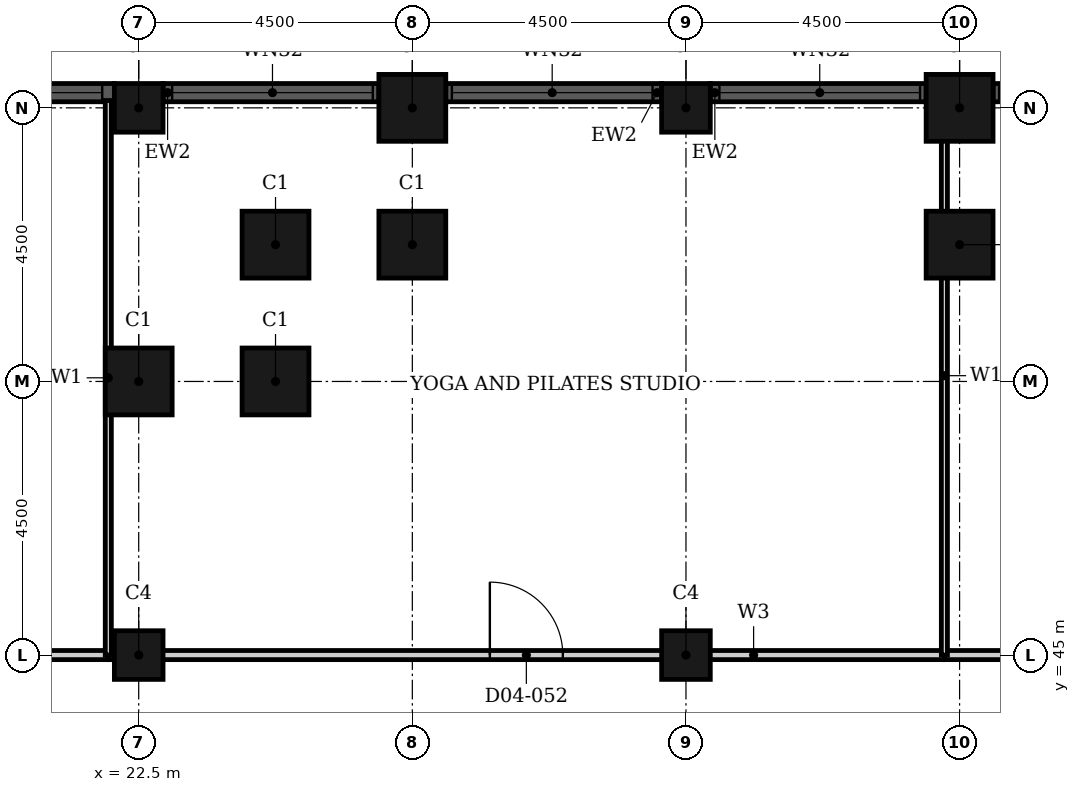
"""IFC4 building model, lengths in metres.
Left out: names, types, materials, properties, quantities, classifications, styles, units other than length and angle.
Written with IfcOpenShell. Run it as: python <this file> out.ifc"""

import sys

from ifc_helpers import new_model, si_unit, direction, frame, frame_2d, origin, origin_2d, place, context, subcontext, project, spatial, rectangle, hollow_rectangle, extrude, element, fill, save


model = new_model("IFC4")
c1 = context("Model", 3, precision=1e-05, world=origin(), true_north=direction((0.0, 1.0)))
c2 = subcontext(c1, "Body", "Model", "MODEL_VIEW")
j1 = project(units=[si_unit("LENGTHUNIT", "METRE"), si_unit("PLANEANGLEUNIT", "RADIAN")], contexts=[c1])
p1 = place(None, origin())
s1 = spatial("IfcSite", under=j1, at=p1, CompositionType="ELEMENT")
p2 = place(p1, origin())
s2 = spatial("IfcBuilding", under=s1, at=p2, CompositionType="ELEMENT")
p3 = place(p2, frame((0.0, 0.0, 24.0)))
s3 = spatial("IfcBuildingStorey", under=s2, at=p3, CompositionType="ELEMENT", Elevation=24.0)
for number, where, z_axis, x_axis in (
    (1, (36.0, 51.75, 0.0), (0.0, 0.0, 1.0), (1.0, 0.0, 0.0)),
    (2, (36.0, 54.0, 0.0), (0.0, 0.0, 1.0), (1.0, 0.0, 0.0)),
    (3, (27.0, 54.0, 0.0), (0.0, 0.0, 1.0), (1.0, 0.0, 0.0)),
    (4, (27.0, 51.75, 0.0), (0.0, 0.0, 1.0), (1.0, 0.0, 0.0)),
    (5, (24.75, 51.75, 0.0), (0.0, 0.0, 1.0), (1.0, 0.0, 0.0)),
    (6, (24.75, 49.5, 0.0), (0.0, 0.0, 1.0), (1.0, 0.0, 0.0)),
    (7, (22.5, 49.5, 0.0), (0.0, 0.0, 1.0), (1.0, 0.0, 0.0)),
):
    element("IfcColumn", number, at=place(p3, frame(where, z_axis=z_axis, x_axis=x_axis)), inside=s3, PredefinedType="COLUMN", context=c2, shape_type="SweptSolid", body=[
        extrude(hollow_rectangle(XDim=1.1, YDim=1.1, WallThickness=0.036, at=origin_2d()), origin(), (0.0, 0.0, 1.0), 4.8),
    ])
for number, where, z_axis, x_axis in (
    (8, (22.5, 54.0, 0.0), (0.0, 0.0, 1.0), (1.0, 0.0, 0.0)),
    (9, (31.5, 54.0, 0.0), (0.0, 0.0, 1.0), (1.0, 0.0, 0.0)),
    (10, (22.5, 45.0, 0.0), (0.0, 0.0, 1.0), (1.0, 0.0, 0.0)),
    (11, (31.5, 45.0, 0.0), (0.0, 0.0, 1.0), (1.0, 0.0, 0.0)),
):
    element("IfcColumn", number, at=place(p3, frame(where, z_axis=z_axis, x_axis=x_axis)), inside=s3, PredefinedType="COLUMN", context=c2, shape_type="SweptSolid", body=[
        extrude(hollow_rectangle(XDim=0.8, YDim=0.8, WallThickness=0.025, at=origin_2d()), origin(), (0.0, 0.0, 1.0), 4.8),
    ])
p4 = place(p3, frame((40.1, 54.25, 0.0), z_axis=(0.0, 0.0, 1.0), x_axis=(-1.0, 0.0, 0.0)))
e12 = element("IfcWall", 12, at=p4, inside=s3, PredefinedType="SOLIDWALL", context=c2, shape_type="SweptSolid", body=[
    extrude(rectangle(XDim=3.55, YDim=0.3, at=frame_2d((1.775, 0.0))), origin(), (0.0, 0.0, 1.0), 4.8),
])
p5 = place(p4, frame((0.15, 0.0, 0.9)))
e13 = element("IfcOpeningElement", 13, at=p5, cuts=e12, PredefinedType="OPENING", context=c2, shape_type="SweptSolid", body=[
    extrude(rectangle(XDim=3.3, YDim=2.9, at=frame_2d((1.65, 1.45))), frame((0.0, 0.16, 0.0), z_axis=(0.0, -1.0, 0.0), x_axis=(1.0, 0.0, 0.0)), (0.0, 0.0, 1.0), 0.32),
])
p6 = place(p3, frame((35.45, 54.25, 0.0), z_axis=(0.0, 0.0, 1.0), x_axis=(-1.0, 0.0, 0.0)))
e14 = element("IfcWall", 14, at=p6, inside=s3, PredefinedType="SOLIDWALL", context=c2, shape_type="SweptSolid", body=[
    extrude(rectangle(XDim=3.55, YDim=0.3, at=frame_2d((1.775, 0.0))), origin(), (0.0, 0.0, 1.0), 4.8),
])
p7 = place(p6, frame((0.1, 0.0, 0.9)))
e15 = element("IfcOpeningElement", 15, at=p7, cuts=e14, PredefinedType="OPENING", context=c2, shape_type="SweptSolid", body=[
    extrude(rectangle(XDim=3.3, YDim=2.9, at=frame_2d((1.65, 1.45))), frame((0.0, 0.16, 0.0), z_axis=(0.0, -1.0, 0.0), x_axis=(1.0, 0.0, 0.0)), (0.0, 0.0, 1.0), 0.32),
])
p8 = place(p3, frame((31.1, 54.25, 0.0), z_axis=(0.0, 0.0, 1.0), x_axis=(-1.0, 0.0, 0.0)))
e16 = element("IfcWall", 16, at=p8, inside=s3, PredefinedType="SOLIDWALL", context=c2, shape_type="SweptSolid", body=[
    extrude(rectangle(XDim=3.55, YDim=0.3, at=frame_2d((1.775, 0.0))), origin(), (0.0, 0.0, 1.0), 4.8),
])
p9 = place(p8, frame((0.15, 0.0, 0.9)))
e17 = element("IfcOpeningElement", 17, at=p9, cuts=e16, PredefinedType="OPENING", context=c2, shape_type="SweptSolid", body=[
    extrude(rectangle(XDim=3.3, YDim=2.9, at=frame_2d((1.65, 1.45))), frame((0.0, 0.16, 0.0), z_axis=(0.0, -1.0, 0.0), x_axis=(1.0, 0.0, 0.0)), (0.0, 0.0, 1.0), 0.32),
])
p10 = place(p3, frame((26.45, 54.25, 0.0), z_axis=(0.0, 0.0, 1.0), x_axis=(-1.0, 0.0, 0.0)))
e18 = element("IfcWall", 18, at=p10, inside=s3, PredefinedType="SOLIDWALL", context=c2, shape_type="SweptSolid", body=[
    extrude(rectangle(XDim=3.55, YDim=0.3, at=frame_2d((1.775, 0.0))), origin(), (0.0, 0.0, 1.0), 4.8),
])
p11 = place(p10, frame((0.1, 0.0, 0.9)))
e19 = element("IfcOpeningElement", 19, at=p11, cuts=e18, PredefinedType="OPENING", context=c2, shape_type="SweptSolid", body=[
    extrude(rectangle(XDim=3.3, YDim=2.9, at=frame_2d((1.65, 1.45))), frame((0.0, 0.16, 0.0), z_axis=(0.0, -1.0, 0.0), x_axis=(1.0, 0.0, 0.0)), (0.0, 0.0, 1.0), 0.32),
])
p12 = place(p3, frame((22.1, 54.25, 0.0), z_axis=(0.0, 0.0, 1.0), x_axis=(-1.0, 0.0, 0.0)))
e20 = element("IfcWall", 20, at=p12, inside=s3, PredefinedType="SOLIDWALL", context=c2, shape_type="SweptSolid", body=[
    extrude(rectangle(XDim=8.2, YDim=0.3, at=frame_2d((4.1, 0.0))), origin(), (0.0, 0.0, 1.0), 4.8),
])
p13 = place(p12, frame((0.2, 0.0, 0.9)))
e21 = element("IfcOpeningElement", 21, at=p13, cuts=e20, PredefinedType="OPENING", context=c2, shape_type="SweptSolid", body=[
    extrude(rectangle(XDim=3.3, YDim=2.9, at=frame_2d((1.65, 1.45))), frame((0.0, 0.16, 0.0), z_axis=(0.0, -1.0, 0.0), x_axis=(1.0, 0.0, 0.0)), (0.0, 0.0, 1.0), 0.32),
])
p14 = place(p12, frame((4.7, 0.0, 0.9)))
e22 = element("IfcOpeningElement", 22, at=p14, cuts=e20, PredefinedType="OPENING", context=c2, shape_type="SweptSolid", body=[
    extrude(rectangle(XDim=3.3, YDim=2.9, at=frame_2d((1.65, 1.45))), frame((0.0, 0.16, 0.0), z_axis=(0.0, -1.0, 0.0), x_axis=(1.0, 0.0, 0.0)), (0.0, 0.0, 1.0), 0.32),
])
p15 = place(p3, frame((15.0, 45.0, 0.0), z_axis=(0.0, 0.0, 1.0), x_axis=(1.0, 0.0, 0.0)))
e23 = element("IfcWall", 23, at=p15, inside=s3, PredefinedType="PARTITIONING", context=c2, shape_type="SweptSolid", body=[
    extrude(rectangle(XDim=7.0, YDim=0.15, at=frame_2d((3.5, 0.0))), origin(), (0.0, 0.0, 1.0), 4.45),
])
p16 = place(p15, frame((3.05, 0.0, 0.0)))
e24 = element("IfcOpeningElement", 24, at=p16, cuts=e23, PredefinedType="OPENING", context=c2, shape_type="SweptSolid", body=[
    extrude(rectangle(XDim=0.9, YDim=2.1, at=frame_2d((0.45, 1.05))), frame((0.0, 0.085, 0.0), z_axis=(0.0, -1.0, 0.0), x_axis=(1.0, 0.0, 0.0)), (0.0, 0.0, 1.0), 0.17),
])
p17 = place(p3, frame((22.0, 45.0, 0.0), z_axis=(0.0, 0.0, 1.0), x_axis=(1.0, 0.0, 0.0)))
e25 = element("IfcWall", 25, at=p17, inside=s3, PredefinedType="PARTITIONING", context=c2, shape_type="SweptSolid", body=[
    extrude(rectangle(XDim=13.75, YDim=0.15, at=frame_2d((6.875, 0.0))), origin(), (0.0, 0.0, 1.0), 4.45),
])
p18 = place(p17, frame((6.275, 0.0, 0.0)))
e26 = element("IfcOpeningElement", 26, at=p18, cuts=e25, PredefinedType="OPENING", context=c2, shape_type="SweptSolid", body=[
    extrude(rectangle(XDim=1.2, YDim=2.4, at=frame_2d((0.6, 1.2))), frame((0.0, 0.085, 0.0), z_axis=(0.0, -1.0, 0.0), x_axis=(1.0, 0.0, 0.0)), (0.0, 0.0, 1.0), 0.17),
])
p19 = place(p3, frame((35.75, 45.0, 0.0), z_axis=(0.0, 0.0, 1.0), x_axis=(1.0, 0.0, 0.0)))
e27 = element("IfcWall", 27, at=p19, inside=s3, PredefinedType="PARTITIONING", context=c2, shape_type="SweptSolid", body=[
    extrude(rectangle(XDim=10.5, YDim=0.15, at=frame_2d((5.25, 0.0))), origin(), (0.0, 0.0, 1.0), 4.45),
])
p20 = place(p19, frame((5.25, 0.0, 0.0)))
e28 = element("IfcOpeningElement", 28, at=p20, cuts=e27, PredefinedType="OPENING", context=c2, shape_type="SweptSolid", body=[
    extrude(rectangle(XDim=0.9, YDim=2.1, at=frame_2d((0.45, 1.05))), frame((0.0, 0.085, 0.0), z_axis=(0.0, -1.0, 0.0), x_axis=(1.0, 0.0, 0.0)), (0.0, 0.0, 1.0), 0.17),
])
p21 = place(p3, frame((22.0, 45.0, 0.0), z_axis=(0.0, 0.0, 1.0), x_axis=(0.0, 1.0, 0.0)))
e29 = element("IfcWall", 29, at=p21, inside=s3, PredefinedType="PARTITIONING", context=c2, shape_type="SweptSolid", body=[
    extrude(rectangle(XDim=9.12, YDim=0.1, at=frame_2d((4.56, 0.0))), origin(), (0.0, 0.0, 1.0), 4.45),
])
p22 = place(p3, frame((35.75, 45.0, 0.0), z_axis=(0.0, 0.0, 1.0), x_axis=(0.0, 1.0, 0.0)))
e30 = element("IfcWall", 30, at=p22, inside=s3, PredefinedType="PARTITIONING", context=c2, shape_type="SweptSolid", body=[
    extrude(rectangle(XDim=9.19, YDim=0.1, at=frame_2d((4.595, 0.0))), origin(), (0.0, 0.0, 1.0), 4.45),
])
p23 = place(p5, origin())
e31 = element("IfcWindow", 31, at=p23, inside=s3, PartitioningType="SINGLE_PANEL", PredefinedType="WINDOW", context=c2, shape_type="SweptSolid", body=[
    extrude(rectangle(XDim=3.3, YDim=2.9, at=frame_2d((1.65, 1.45))), frame((0.0, 0.03, 0.0), z_axis=(0.0, -1.0, 0.0), x_axis=(1.0, 0.0, 0.0)), (0.0, 0.0, 1.0), 0.06),
])
fill(e13, e31)
p24 = place(p7, origin())
e32 = element("IfcWindow", 32, at=p24, inside=s3, PartitioningType="SINGLE_PANEL", PredefinedType="WINDOW", context=c2, shape_type="SweptSolid", body=[
    extrude(rectangle(XDim=3.3, YDim=2.9, at=frame_2d((1.65, 1.45))), frame((0.0, 0.03, 0.0), z_axis=(0.0, -1.0, 0.0), x_axis=(1.0, 0.0, 0.0)), (0.0, 0.0, 1.0), 0.06),
])
fill(e15, e32)
p25 = place(p9, origin())
e33 = element("IfcWindow", 33, at=p25, inside=s3, PartitioningType="SINGLE_PANEL", PredefinedType="WINDOW", context=c2, shape_type="SweptSolid", body=[
    extrude(rectangle(XDim=3.3, YDim=2.9, at=frame_2d((1.65, 1.45))), frame((0.0, 0.03, 0.0), z_axis=(0.0, -1.0, 0.0), x_axis=(1.0, 0.0, 0.0)), (0.0, 0.0, 1.0), 0.06),
])
fill(e17, e33)
p26 = place(p11, origin())
e34 = element("IfcWindow", 34, at=p26, inside=s3, PartitioningType="SINGLE_PANEL", PredefinedType="WINDOW", context=c2, shape_type="SweptSolid", body=[
    extrude(rectangle(XDim=3.3, YDim=2.9, at=frame_2d((1.65, 1.45))), frame((0.0, 0.03, 0.0), z_axis=(0.0, -1.0, 0.0), x_axis=(1.0, 0.0, 0.0)), (0.0, 0.0, 1.0), 0.06),
])
fill(e19, e34)
p27 = place(p13, origin())
e35 = element("IfcWindow", 35, at=p27, inside=s3, PartitioningType="SINGLE_PANEL", PredefinedType="WINDOW", context=c2, shape_type="SweptSolid", body=[
    extrude(rectangle(XDim=3.3, YDim=2.9, at=frame_2d((1.65, 1.45))), frame((0.0, 0.03, 0.0), z_axis=(0.0, -1.0, 0.0), x_axis=(1.0, 0.0, 0.0)), (0.0, 0.0, 1.0), 0.06),
])
fill(e21, e35)
p28 = place(p18, origin())
e36 = element("IfcDoor", 36, at=p28, inside=s3, OperationType="SINGLE_SWING_LEFT", PredefinedType="DOOR", context=c2, shape_type="SweptSolid", body=[
    extrude(rectangle(XDim=1.2, YDim=2.4, at=frame_2d((0.6, 1.2))), frame((0.0, 0.025, 0.0), z_axis=(0.0, -1.0, 0.0), x_axis=(1.0, 0.0, 0.0)), (0.0, 0.0, 1.0), 0.05),
])
fill(e26, e36)
save(model, sys.argv[1])
